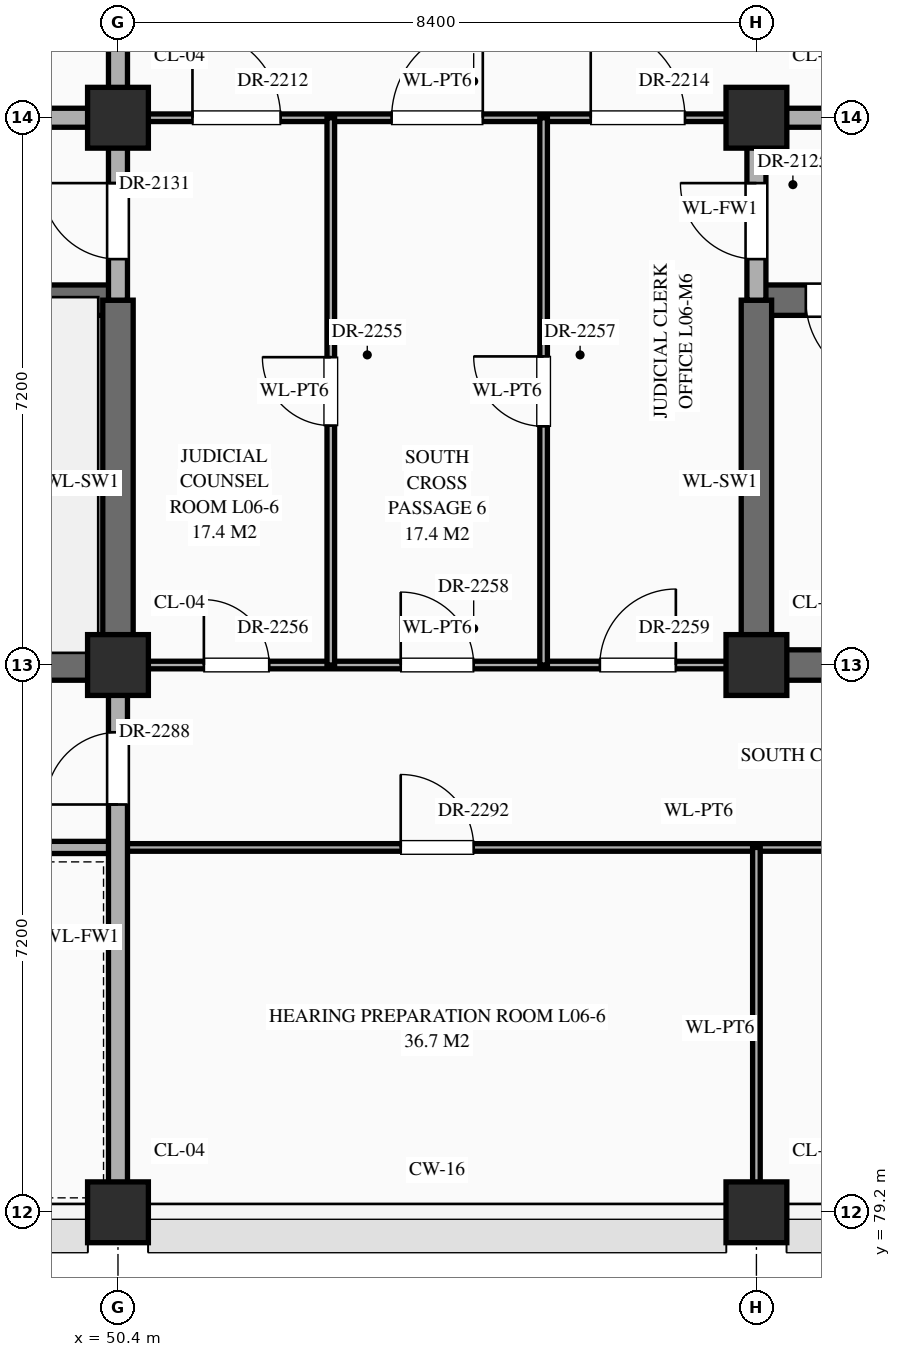
"""IFC4 building model, lengths in metres.
Left out: names, types, materials, properties, quantities, classifications, styles, units other than length and angle.
Written with IfcOpenShell. Run it as: python <this file> out.ifc"""

import sys

from ifc_helpers import new_model, si_unit, direction, frame, frame_2d, origin, origin_2d, place, context, subcontext, project, spatial, rectangle, extrude, element, fill, save


model = new_model("IFC4")
c1 = context("Model", 3, precision=1e-05, world=origin(), true_north=direction((0.0, 1.0)))
c2 = subcontext(c1, "Body", "Model", "MODEL_VIEW")
j1 = project(units=[si_unit("LENGTHUNIT", "METRE"), si_unit("PLANEANGLEUNIT", "RADIAN")], contexts=[c1])
p1 = place(None, origin())
s1 = spatial("IfcSite", under=j1, at=p1, CompositionType="ELEMENT")
p2 = place(p1, origin())
s2 = spatial("IfcBuilding", under=s1, at=p2, CompositionType="ELEMENT")
p3 = place(p2, frame((0.0, 0.0, 26.1)))
s3 = spatial("IfcBuildingStorey", under=s2, at=p3, CompositionType="ELEMENT", Elevation=26.1)
for number, where, z_axis, x_axis in (
    (1, (50.4, 79.2, 0.0), (0.0, 0.0, 1.0), (1.0, 0.0, 0.0)),
    (2, (50.4, 86.4, 0.0), (0.0, 0.0, 1.0), (1.0, 0.0, 0.0)),
    (3, (50.4, 93.6, 0.0), (0.0, 0.0, 1.0), (1.0, 0.0, 0.0)),
    (4, (58.8, 79.2, 0.0), (0.0, 0.0, 1.0), (1.0, 0.0, 0.0)),
    (5, (58.8, 86.4, 0.0), (0.0, 0.0, 1.0), (1.0, 0.0, 0.0)),
    (6, (58.8, 93.6, 0.0), (0.0, 0.0, 1.0), (1.0, 0.0, 0.0)),
):
    element("IfcColumn", number, at=place(p3, frame(where, z_axis=z_axis, x_axis=x_axis)), inside=s3, PredefinedType="COLUMN", context=c2, shape_type="SweptSolid", body=[
        extrude(rectangle(XDim=0.8, YDim=0.8, at=origin_2d()), origin(), (0.0, 0.0, 1.0), 4.5),
    ])
p4 = place(p3, frame((33.6, 84.0, 0.0), z_axis=(0.0, 0.0, 1.0), x_axis=(1.0, 0.0, 0.0)))
e7 = element("IfcWall", 7, at=p4, inside=s3, PredefinedType="STANDARD", context=c2, shape_type="SweptSolid", body=[
    extrude(rectangle(XDim=16.8, YDim=0.16, at=frame_2d((8.4, 0.0))), origin(), (0.0, 0.0, 1.0), 4.24),
])
p5 = place(p4, frame((7.675, 0.0, 0.0)))
e8 = element("IfcOpeningElement", 8, at=p5, cuts=e7, PredefinedType="OPENING", context=c2, shape_type="SweptSolid", body=[
    extrude(rectangle(XDim=1.45, YDim=2.3, at=frame_2d((0.725, 1.15))), frame((0.0, 0.092, 0.0), z_axis=(0.0, -1.0, 0.0), x_axis=(1.0, 0.0, 0.0)), (0.0, 0.0, 1.0), 0.184),
])
p6 = place(p3, frame((50.4, 84.0, 0.0), z_axis=(0.0, 0.0, 1.0), x_axis=(1.0, 0.0, 0.0)))
e9 = element("IfcWall", 9, at=p6, inside=s3, PredefinedType="STANDARD", context=c2, shape_type="SweptSolid", body=[
    extrude(rectangle(XDim=16.8, YDim=0.1, at=frame_2d((8.4, 0.0))), origin(), (0.0, 0.0, 1.0), 4.24),
])
p7 = place(p6, frame((3.72, 0.0, 0.0)))
e10 = element("IfcOpeningElement", 10, at=p7, cuts=e9, PredefinedType="OPENING", context=c2, shape_type="SweptSolid", body=[
    extrude(rectangle(XDim=0.96, YDim=2.2, at=frame_2d((0.48, 1.1))), frame((0.0, 0.062, 0.0), z_axis=(0.0, -1.0, 0.0), x_axis=(1.0, 0.0, 0.0)), (0.0, 0.0, 1.0), 0.124),
])
p8 = place(p6, frame((12.1, 0.0, 0.0)))
e11 = element("IfcOpeningElement", 11, at=p8, cuts=e9, PredefinedType="OPENING", context=c2, shape_type="SweptSolid", body=[
    extrude(rectangle(XDim=1.0, YDim=2.25, at=frame_2d((0.5, 1.125))), frame((0.0, 0.062, 0.0), z_axis=(0.0, -1.0, 0.0), x_axis=(1.0, 0.0, 0.0)), (0.0, 0.0, 1.0), 0.124),
])
p9 = place(p3, frame((42.0, 86.4, 0.0), z_axis=(0.0, 0.0, 1.0), x_axis=(1.0, 0.0, 0.0)))
e12 = element("IfcWall", 12, at=p9, inside=s3, PredefinedType="SHEAR", context=c2, shape_type="SweptSolid", body=[
    extrude(rectangle(XDim=8.4, YDim=0.4, at=frame_2d((4.2, 0.0))), origin(), (0.0, 0.0, 1.0), 4.24),
])
p10 = place(p3, frame((50.4, 86.4, 0.0), z_axis=(0.0, 0.0, 1.0), x_axis=(1.0, 0.0, 0.0)))
e13 = element("IfcWall", 13, at=p10, inside=s3, PredefinedType="STANDARD", context=c2, shape_type="SweptSolid", body=[
    extrude(rectangle(XDim=8.4, YDim=0.1, at=frame_2d((4.2, 0.0))), origin(), (0.0, 0.0, 1.0), 3.39),
])
p11 = place(p10, frame((1.13, 0.0, 0.0)))
e14 = element("IfcOpeningElement", 14, at=p11, cuts=e13, PredefinedType="OPENING", context=c2, shape_type="SweptSolid", body=[
    extrude(rectangle(XDim=0.86, YDim=2.1, at=frame_2d((0.43, 1.05))), frame((0.0, 0.062, 0.0), z_axis=(0.0, -1.0, 0.0), x_axis=(1.0, 0.0, 0.0)), (0.0, 0.0, 1.0), 0.124),
])
p12 = place(p10, frame((3.72, 0.0, 0.0)))
e15 = element("IfcOpeningElement", 15, at=p12, cuts=e13, PredefinedType="OPENING", context=c2, shape_type="SweptSolid", body=[
    extrude(rectangle(XDim=0.96, YDim=2.2, at=frame_2d((0.48, 1.1))), frame((0.0, 0.062, 0.0), z_axis=(0.0, -1.0, 0.0), x_axis=(1.0, 0.0, 0.0)), (0.0, 0.0, 1.0), 0.124),
])
p13 = place(p10, frame((6.34, 0.0, 0.0)))
e16 = element("IfcOpeningElement", 16, at=p13, cuts=e13, PredefinedType="OPENING", context=c2, shape_type="SweptSolid", body=[
    extrude(rectangle(XDim=1.0, YDim=2.25, at=frame_2d((0.5, 1.125))), frame((0.0, 0.062, 0.0), z_axis=(0.0, -1.0, 0.0), x_axis=(1.0, 0.0, 0.0)), (0.0, 0.0, 1.0), 0.124),
])
p14 = place(p3, frame((58.8, 86.4, 0.0), z_axis=(0.0, 0.0, 1.0), x_axis=(1.0, 0.0, 0.0)))
e17 = element("IfcWall", 17, at=p14, inside=s3, PredefinedType="SHEAR", context=c2, shape_type="SweptSolid", body=[
    extrude(rectangle(XDim=8.4, YDim=0.4, at=frame_2d((4.2, 0.0))), origin(), (0.0, 0.0, 1.0), 4.24),
])
p15 = place(p3, frame((42.0, 91.2, 0.0), z_axis=(0.0, 0.0, 1.0), x_axis=(1.0, 0.0, 0.0)))
e18 = element("IfcWall", 18, at=p15, inside=s3, PredefinedType="SHEAR", context=c2, shape_type="SweptSolid", body=[
    extrude(rectangle(XDim=8.4, YDim=0.4, at=frame_2d((4.2, 0.0))), origin(), (0.0, 0.0, 1.0), 4.24),
])
p16 = place(p15, frame((0.65, 0.0, 0.0)))
e19 = element("IfcOpeningElement", 19, at=p16, cuts=e18, PredefinedType="OPENING", context=c2, shape_type="SweptSolid", body=[
    extrude(rectangle(XDim=1.1, YDim=2.2, at=frame_2d((0.55, 1.1))), frame((0.0, 0.212, 0.0), z_axis=(0.0, -1.0, 0.0), x_axis=(1.0, 0.0, 0.0)), (0.0, 0.0, 1.0), 0.424),
])
p17 = place(p3, frame((58.8, 91.2, 0.0), z_axis=(0.0, 0.0, 1.0), x_axis=(1.0, 0.0, 0.0)))
e20 = element("IfcWall", 20, at=p17, inside=s3, PredefinedType="SHEAR", context=c2, shape_type="SweptSolid", body=[
    extrude(rectangle(XDim=8.4, YDim=0.4, at=frame_2d((4.2, 0.0))), origin(), (0.0, 0.0, 1.0), 4.24),
])
p18 = place(p17, frame((0.65, 0.0, 0.0)))
e21 = element("IfcOpeningElement", 21, at=p18, cuts=e20, PredefinedType="OPENING", context=c2, shape_type="SweptSolid", body=[
    extrude(rectangle(XDim=1.1, YDim=2.2, at=frame_2d((0.55, 1.1))), frame((0.0, 0.212, 0.0), z_axis=(0.0, -1.0, 0.0), x_axis=(1.0, 0.0, 0.0)), (0.0, 0.0, 1.0), 0.424),
])
p19 = place(p3, frame((42.0, 93.6, 0.0), z_axis=(0.0, 0.0, 1.0), x_axis=(1.0, 0.0, 0.0)))
e22 = element("IfcWall", 22, at=p19, inside=s3, PredefinedType="STANDARD", context=c2, shape_type="SweptSolid", body=[
    extrude(rectangle(XDim=8.4, YDim=0.25, at=frame_2d((4.2, 0.0))), origin(), (0.0, 0.0, 1.0), 3.39),
])
p20 = place(p19, frame((3.2, 0.0, 0.0)))
e23 = element("IfcOpeningElement", 23, at=p20, cuts=e22, PredefinedType="OPENING", context=c2, shape_type="SweptSolid", body=[
    extrude(rectangle(XDim=2.0, YDim=2.4, at=frame_2d((1.0, 1.2))), frame((0.0, 0.137, 0.0), z_axis=(0.0, -1.0, 0.0), x_axis=(1.0, 0.0, 0.0)), (0.0, 0.0, 1.0), 0.274),
])
p21 = place(p3, frame((50.4, 93.6, 0.0), z_axis=(0.0, 0.0, 1.0), x_axis=(1.0, 0.0, 0.0)))
e24 = element("IfcWall", 24, at=p21, inside=s3, PredefinedType="STANDARD", context=c2, shape_type="SweptSolid", body=[
    extrude(rectangle(XDim=8.4, YDim=0.1, at=frame_2d((4.2, 0.0))), origin(), (0.0, 0.0, 1.0), 3.39),
])
p22 = place(p21, frame((0.98, 0.0, 0.0)))
e25 = element("IfcOpeningElement", 25, at=p22, cuts=e24, PredefinedType="OPENING", context=c2, shape_type="SweptSolid", body=[
    extrude(rectangle(XDim=1.16, YDim=2.3, at=frame_2d((0.58, 1.15))), frame((0.0, 0.062, 0.0), z_axis=(0.0, -1.0, 0.0), x_axis=(1.0, 0.0, 0.0)), (0.0, 0.0, 1.0), 0.124),
])
p23 = place(p21, frame((3.6, 0.0, 0.0)))
e26 = element("IfcOpeningElement", 26, at=p23, cuts=e24, PredefinedType="OPENING", context=c2, shape_type="SweptSolid", body=[
    extrude(rectangle(XDim=1.2, YDim=2.35, at=frame_2d((0.6, 1.175))), frame((0.0, 0.062, 0.0), z_axis=(0.0, -1.0, 0.0), x_axis=(1.0, 0.0, 0.0)), (0.0, 0.0, 1.0), 0.124),
])
p24 = place(p21, frame((6.22, 0.0, 0.0)))
e27 = element("IfcOpeningElement", 27, at=p24, cuts=e24, PredefinedType="OPENING", context=c2, shape_type="SweptSolid", body=[
    extrude(rectangle(XDim=1.24, YDim=2.3, at=frame_2d((0.62, 1.15))), frame((0.0, 0.062, 0.0), z_axis=(0.0, -1.0, 0.0), x_axis=(1.0, 0.0, 0.0)), (0.0, 0.0, 1.0), 0.124),
])
p25 = place(p3, frame((58.8, 93.6, 0.0), z_axis=(0.0, 0.0, 1.0), x_axis=(1.0, 0.0, 0.0)))
e28 = element("IfcWall", 28, at=p25, inside=s3, PredefinedType="STANDARD", context=c2, shape_type="SweptSolid", body=[
    extrude(rectangle(XDim=8.4, YDim=0.25, at=frame_2d((4.2, 0.0))), origin(), (0.0, 0.0, 1.0), 3.39),
])
p26 = place(p25, frame((3.45, 0.0, 0.0)))
e29 = element("IfcOpeningElement", 29, at=p26, cuts=e28, PredefinedType="OPENING", context=c2, shape_type="SweptSolid", body=[
    extrude(rectangle(XDim=1.5, YDim=2.25, at=frame_2d((0.75, 1.125))), frame((0.0, 0.137, 0.0), z_axis=(0.0, -1.0, 0.0), x_axis=(1.0, 0.0, 0.0)), (0.0, 0.0, 1.0), 0.274),
])
p27 = place(p3, frame((50.4, 79.24, 0.0), z_axis=(0.0, 0.0, 1.0), x_axis=(0.0, 1.0, 0.0)))
e30 = element("IfcWall", 30, at=p27, inside=s3, PredefinedType="STANDARD", context=c2, shape_type="SweptSolid", body=[
    extrude(rectangle(XDim=7.16, YDim=0.25, at=frame_2d((3.58, 0.0))), origin(), (0.0, 0.0, 1.0), 3.49),
])
p28 = place(p27, frame((5.325, 0.0, 0.0)))
e31 = element("IfcOpeningElement", 31, at=p28, cuts=e30, PredefinedType="OPENING", context=c2, shape_type="SweptSolid", body=[
    extrude(rectangle(XDim=0.95, YDim=2.15, at=frame_2d((0.475, 1.075))), frame((0.0, 0.137, 0.0), z_axis=(0.0, -1.0, 0.0), x_axis=(1.0, 0.0, 0.0)), (0.0, 0.0, 1.0), 0.274),
])
p29 = place(p3, frame((50.4, 86.4, 0.0), z_axis=(0.0, 0.0, 1.0), x_axis=(0.0, 1.0, 0.0)))
e32 = element("IfcWall", 32, at=p29, inside=s3, PredefinedType="SHEAR", context=c2, shape_type="SweptSolid", body=[
    extrude(rectangle(XDim=4.8, YDim=0.4, at=frame_2d((2.4, 0.0))), origin(), (0.0, 0.0, 1.0), 4.24),
])
p30 = place(p3, frame((50.4, 91.2, 0.0), z_axis=(0.0, 0.0, 1.0), x_axis=(0.0, 1.0, 0.0)))
e33 = element("IfcWall", 33, at=p30, inside=s3, PredefinedType="STANDARD", context=c2, shape_type="SweptSolid", body=[
    extrude(rectangle(XDim=13.2, YDim=0.25, at=frame_2d((6.6, 0.0))), origin(), (0.0, 0.0, 1.0), 3.49),
])
p31 = place(p30, frame((0.54, 0.0, 0.0)))
e34 = element("IfcOpeningElement", 34, at=p31, cuts=e33, PredefinedType="OPENING", context=c2, shape_type="SweptSolid", body=[
    extrude(rectangle(XDim=1.0, YDim=2.2, at=frame_2d((0.5, 1.1))), frame((0.0, 0.137, 0.0), z_axis=(0.0, -1.0, 0.0), x_axis=(1.0, 0.0, 0.0)), (0.0, 0.0, 1.0), 0.274),
])
p32 = place(p30, frame((10.41, 0.0, 0.0)))
e35 = element("IfcOpeningElement", 35, at=p32, cuts=e33, PredefinedType="OPENING", context=c2, shape_type="SweptSolid", body=[
    extrude(rectangle(XDim=1.1, YDim=2.2, at=frame_2d((0.55, 1.1))), frame((0.0, 0.137, 0.0), z_axis=(0.0, -1.0, 0.0), x_axis=(1.0, 0.0, 0.0)), (0.0, 0.0, 1.0), 0.274),
])
p33 = place(p30, frame((3.285, 0.0, 0.0)))
e36 = element("IfcOpeningElement", 36, at=p33, cuts=e33, PredefinedType="OPENING", context=c2, shape_type="SweptSolid", body=[
    extrude(rectangle(XDim=0.95, YDim=2.15, at=frame_2d((0.475, 1.075))), frame((0.0, 0.137, 0.0), z_axis=(0.0, -1.0, 0.0), x_axis=(1.0, 0.0, 0.0)), (0.0, 0.0, 1.0), 0.274),
])
p34 = place(p3, frame((53.2, 86.4, 0.0), z_axis=(0.0, 0.0, 1.0), x_axis=(0.0, 1.0, 0.0)))
e37 = element("IfcWall", 37, at=p34, inside=s3, PredefinedType="STANDARD", context=c2, shape_type="SweptSolid", body=[
    extrude(rectangle(XDim=7.2, YDim=0.1, at=frame_2d((3.6, 0.0))), origin(), (0.0, 0.0, 1.0), 4.24),
])
p35 = place(p34, frame((3.15, 0.0, 0.0)))
e38 = element("IfcOpeningElement", 38, at=p35, cuts=e37, PredefinedType="OPENING", context=c2, shape_type="SweptSolid", body=[
    extrude(rectangle(XDim=0.9, YDim=2.15, at=frame_2d((0.45, 1.075))), frame((0.0, 0.062, 0.0), z_axis=(0.0, -1.0, 0.0), x_axis=(1.0, 0.0, 0.0)), (0.0, 0.0, 1.0), 0.124),
])
p36 = place(p3, frame((56.0, 86.4, 0.0), z_axis=(0.0, 0.0, 1.0), x_axis=(0.0, 1.0, 0.0)))
e39 = element("IfcWall", 39, at=p36, inside=s3, PredefinedType="STANDARD", context=c2, shape_type="SweptSolid", body=[
    extrude(rectangle(XDim=7.2, YDim=0.1, at=frame_2d((3.6, 0.0))), origin(), (0.0, 0.0, 1.0), 4.24),
])
p37 = place(p36, frame((3.14, 0.0, 0.0)))
e40 = element("IfcOpeningElement", 40, at=p37, cuts=e39, PredefinedType="OPENING", context=c2, shape_type="SweptSolid", body=[
    extrude(rectangle(XDim=0.92, YDim=2.15, at=frame_2d((0.46, 1.075))), frame((0.0, 0.062, 0.0), z_axis=(0.0, -1.0, 0.0), x_axis=(1.0, 0.0, 0.0)), (0.0, 0.0, 1.0), 0.124),
])
p38 = place(p3, frame((58.8, 79.24, 0.0), z_axis=(0.0, 0.0, 1.0), x_axis=(0.0, 1.0, 0.0)))
e41 = element("IfcWall", 41, at=p38, inside=s3, PredefinedType="STANDARD", context=c2, shape_type="SweptSolid", body=[
    extrude(rectangle(XDim=4.76, YDim=0.1, at=frame_2d((2.38, 0.0))), origin(), (0.0, 0.0, 1.0), 3.49),
])
p39 = place(p3, frame((58.8, 86.4, 0.0), z_axis=(0.0, 0.0, 1.0), x_axis=(0.0, 1.0, 0.0)))
e42 = element("IfcWall", 42, at=p39, inside=s3, PredefinedType="SHEAR", context=c2, shape_type="SweptSolid", body=[
    extrude(rectangle(XDim=4.8, YDim=0.4, at=frame_2d((2.4, 0.0))), origin(), (0.0, 0.0, 1.0), 4.24),
])
p40 = place(p3, frame((58.8, 91.2, 0.0), z_axis=(0.0, 0.0, 1.0), x_axis=(0.0, 1.0, 0.0)))
e43 = element("IfcWall", 43, at=p40, inside=s3, PredefinedType="STANDARD", context=c2, shape_type="SweptSolid", body=[
    extrude(rectangle(XDim=2.4, YDim=0.25, at=frame_2d((1.2, 0.0))), origin(), (0.0, 0.0, 1.0), 3.49),
])
p41 = place(p40, frame((0.54, 0.0, 0.0)))
e44 = element("IfcOpeningElement", 44, at=p41, cuts=e43, PredefinedType="OPENING", context=c2, shape_type="SweptSolid", body=[
    extrude(rectangle(XDim=1.0, YDim=2.2, at=frame_2d((0.5, 1.1))), frame((0.0, 0.137, 0.0), z_axis=(0.0, -1.0, 0.0), x_axis=(1.0, 0.0, 0.0)), (0.0, 0.0, 1.0), 0.274),
])
p42 = place(p18, frame((1.1, 0.0, 0.0), z_axis=(0.0, 0.0, 1.0), x_axis=(-1.0, 0.0, 0.0)))
e45 = element("IfcDoor", 45, at=p42, inside=s3, OperationType="SINGLE_SWING_LEFT", PredefinedType="DOOR", context=c2, shape_type="SweptSolid", body=[
    extrude(rectangle(XDim=1.1, YDim=2.2, at=frame_2d((0.55, 1.1))), frame((0.0, 0.025, 0.0), z_axis=(0.0, -1.0, 0.0), x_axis=(1.0, 0.0, 0.0)), (0.0, 0.0, 1.0), 0.05),
])
fill(e21, e45)
p43 = place(p41, origin())
e46 = element("IfcDoor", 46, at=p43, inside=s3, OperationType="SINGLE_SWING_RIGHT", PredefinedType="DOOR", context=c2, shape_type="SweptSolid", body=[
    extrude(rectangle(XDim=1.0, YDim=2.2, at=frame_2d((0.5, 1.1))), frame((0.0, 0.025, 0.0), z_axis=(0.0, -1.0, 0.0), x_axis=(1.0, 0.0, 0.0)), (0.0, 0.0, 1.0), 0.05),
])
fill(e44, e46)
p44 = place(p31, origin())
e47 = element("IfcDoor", 47, at=p44, inside=s3, OperationType="SINGLE_SWING_RIGHT", PredefinedType="DOOR", context=c2, shape_type="SweptSolid", body=[
    extrude(rectangle(XDim=1.0, YDim=2.2, at=frame_2d((0.5, 1.1))), frame((0.0, 0.025, 0.0), z_axis=(0.0, -1.0, 0.0), x_axis=(1.0, 0.0, 0.0)), (0.0, 0.0, 1.0), 0.05),
])
fill(e34, e47)
p45 = place(p22, origin())
e48 = element("IfcDoor", 48, at=p45, inside=s3, OperationType="SINGLE_SWING_LEFT", PredefinedType="DOOR", context=c2, shape_type="SweptSolid", body=[
    extrude(rectangle(XDim=1.16, YDim=2.3, at=frame_2d((0.58, 1.15))), frame((0.0, 0.025, 0.0), z_axis=(0.0, -1.0, 0.0), x_axis=(1.0, 0.0, 0.0)), (0.0, 0.0, 1.0), 0.05),
])
fill(e25, e48)
p46 = place(p23, origin())
e49 = element("IfcDoor", 49, at=p46, inside=s3, OperationType="SINGLE_SWING_RIGHT", PredefinedType="DOOR", context=c2, shape_type="SweptSolid", body=[
    extrude(rectangle(XDim=1.2, YDim=2.35, at=frame_2d((0.6, 1.175))), frame((0.0, 0.025, 0.0), z_axis=(0.0, -1.0, 0.0), x_axis=(1.0, 0.0, 0.0)), (0.0, 0.0, 1.0), 0.05),
])
fill(e26, e49)
p47 = place(p24, origin())
e50 = element("IfcDoor", 50, at=p47, inside=s3, OperationType="SINGLE_SWING_LEFT", PredefinedType="DOOR", context=c2, shape_type="SweptSolid", body=[
    extrude(rectangle(XDim=1.24, YDim=2.3, at=frame_2d((0.62, 1.15))), frame((0.0, 0.025, 0.0), z_axis=(0.0, -1.0, 0.0), x_axis=(1.0, 0.0, 0.0)), (0.0, 0.0, 1.0), 0.05),
])
fill(e27, e50)
p48 = place(p35, origin())
e51 = element("IfcDoor", 51, at=p48, inside=s3, OperationType="SINGLE_SWING_RIGHT", PredefinedType="DOOR", context=c2, shape_type="SweptSolid", body=[
    extrude(rectangle(XDim=0.9, YDim=2.15, at=frame_2d((0.45, 1.075))), frame((0.0, 0.025, 0.0), z_axis=(0.0, -1.0, 0.0), x_axis=(1.0, 0.0, 0.0)), (0.0, 0.0, 1.0), 0.05),
])
fill(e38, e51)
p49 = place(p11, origin())
e52 = element("IfcDoor", 52, at=p49, inside=s3, OperationType="SINGLE_SWING_LEFT", PredefinedType="DOOR", context=c2, shape_type="SweptSolid", body=[
    extrude(rectangle(XDim=0.86, YDim=2.1, at=frame_2d((0.43, 1.05))), frame((0.0, 0.025, 0.0), z_axis=(0.0, -1.0, 0.0), x_axis=(1.0, 0.0, 0.0)), (0.0, 0.0, 1.0), 0.05),
])
fill(e14, e52)
p50 = place(p37, origin())
e53 = element("IfcDoor", 53, at=p50, inside=s3, OperationType="SINGLE_SWING_RIGHT", PredefinedType="DOOR", context=c2, shape_type="SweptSolid", body=[
    extrude(rectangle(XDim=0.92, YDim=2.15, at=frame_2d((0.46, 1.075))), frame((0.0, 0.025, 0.0), z_axis=(0.0, -1.0, 0.0), x_axis=(1.0, 0.0, 0.0)), (0.0, 0.0, 1.0), 0.05),
])
fill(e40, e53)
p51 = place(p12, origin())
e54 = element("IfcDoor", 54, at=p51, inside=s3, OperationType="SINGLE_SWING_LEFT", PredefinedType="DOOR", context=c2, shape_type="SweptSolid", body=[
    extrude(rectangle(XDim=0.96, YDim=2.2, at=frame_2d((0.48, 1.1))), frame((0.0, 0.025, 0.0), z_axis=(0.0, -1.0, 0.0), x_axis=(1.0, 0.0, 0.0)), (0.0, 0.0, 1.0), 0.05),
])
fill(e15, e54)
p52 = place(p13, origin())
e55 = element("IfcDoor", 55, at=p52, inside=s3, OperationType="SINGLE_SWING_RIGHT", PredefinedType="DOOR", context=c2, shape_type="SweptSolid", body=[
    extrude(rectangle(XDim=1.0, YDim=2.25, at=frame_2d((0.5, 1.125))), frame((0.0, 0.025, 0.0), z_axis=(0.0, -1.0, 0.0), x_axis=(1.0, 0.0, 0.0)), (0.0, 0.0, 1.0), 0.05),
])
fill(e16, e55)
p53 = place(p28, origin())
e56 = element("IfcDoor", 56, at=p53, inside=s3, OperationType="SINGLE_SWING_LEFT", PredefinedType="DOOR", context=c2, shape_type="SweptSolid", body=[
    extrude(rectangle(XDim=0.95, YDim=2.15, at=frame_2d((0.475, 1.075))), frame((0.0, 0.025, 0.0), z_axis=(0.0, -1.0, 0.0), x_axis=(1.0, 0.0, 0.0)), (0.0, 0.0, 1.0), 0.05),
])
fill(e31, e56)
p54 = place(p7, origin())
e57 = element("IfcDoor", 57, at=p54, inside=s3, OperationType="SINGLE_SWING_LEFT", PredefinedType="DOOR", context=c2, shape_type="SweptSolid", body=[
    extrude(rectangle(XDim=0.96, YDim=2.2, at=frame_2d((0.48, 1.1))), frame((0.0, 0.025, 0.0), z_axis=(0.0, -1.0, 0.0), x_axis=(1.0, 0.0, 0.0)), (0.0, 0.0, 1.0), 0.05),
])
fill(e10, e57)
save(model, sys.argv[1])
